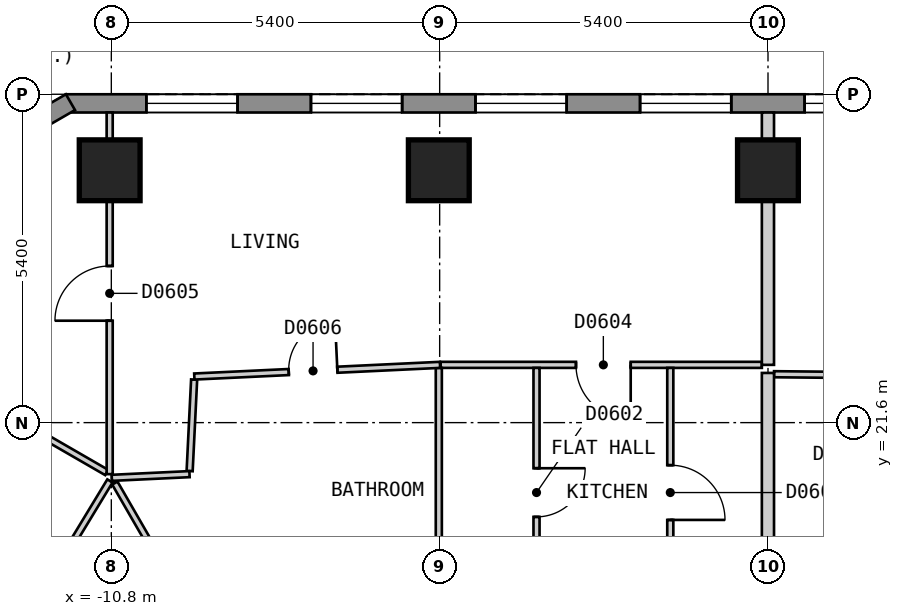
"""IFC4 building model, lengths in metres.
Left out: names, types, materials, properties, quantities, classifications, styles, units other than length and angle.
Written with IfcOpenShell. Run it as: python <this file> out.ifc"""

import sys

from ifc_helpers import new_model, si_unit, direction, frame, frame_2d, origin, origin_2d, place, context, subcontext, project, spatial, polyline, rectangle, outline, extrude, element, fill, save


model = new_model("IFC4")
c1 = context("Model", 3, precision=1e-05, world=origin(), true_north=direction((0.0, 1.0)))
c2 = subcontext(c1, "Body", "Model", "MODEL_VIEW")
j1 = project(units=[si_unit("LENGTHUNIT", "METRE"), si_unit("PLANEANGLEUNIT", "RADIAN")], contexts=[c1])
p1 = place(None, origin())
s1 = spatial("IfcSite", under=j1, at=p1, CompositionType="ELEMENT")
p2 = place(p1, origin())
s2 = spatial("IfcBuilding", under=s1, at=p2, CompositionType="ELEMENT")
p3 = place(p2, frame((0.0, 0.0, 75.0)))
s3 = spatial("IfcBuildingStorey", under=s2, at=p3, CompositionType="ELEMENT", Elevation=75.0)
for number, where, z_axis, x_axis in (
    (1, (-0.001, 25.75, 0.0), (0.0, 0.0, 1.0), (-1.0, 0.0, 0.0)),
    (2, (-5.414, 25.75, 0.0), (0.0, 0.0, 1.0), (-1.0, 0.0, 0.0)),
    (3, (-10.827, 25.75, 0.0), (0.0, 0.0, 1.0), (-1.0, 0.0, 0.0)),
):
    element("IfcColumn", number, at=place(p3, frame(where, z_axis=z_axis, x_axis=x_axis)), inside=s3, PredefinedType="COLUMN", context=c2, shape_type="SweptSolid", body=[
        extrude(rectangle(XDim=1.0, YDim=1.0, at=origin_2d()), origin(), (0.0, 0.0, 1.0), 3.0),
    ])
p4 = place(p3, frame((11.547, 26.85, 0.0), z_axis=(0.0, 0.0, 1.0), x_axis=(-1.0, 0.0, 0.0)))
e4 = element("IfcWall", 4, at=p4, inside=s3, PredefinedType="SOLIDWALL", context=c2, shape_type="SweptSolid", body=[
    extrude(outline(polyline([(0.0, -0.15), (23.094, -0.15), (23.014, 0.15), (0.08, 0.15), (0.0, -0.15)])), origin(), (0.0, 0.0, 1.0), 2.7),
])
p5 = place(p4, frame((1.325, 0.0, 0.15)))
e5 = element("IfcOpeningElement", 5, at=p5, cuts=e4, PredefinedType="OPENING", context=c2, shape_type="SweptSolid", body=[
    extrude(rectangle(XDim=1.5, YDim=2.1, at=frame_2d((0.75, 1.05))), frame((0.0, 0.16, 0.0), z_axis=(0.0, -1.0, 0.0), x_axis=(1.0, 0.0, 0.0)), (0.0, 0.0, 1.0), 0.32),
])
p6 = place(p4, frame((4.032, 0.0, 0.15)))
e6 = element("IfcOpeningElement", 6, at=p6, cuts=e4, PredefinedType="OPENING", context=c2, shape_type="SweptSolid", body=[
    extrude(rectangle(XDim=1.5, YDim=2.1, at=frame_2d((0.75, 1.05))), frame((0.0, 0.16, 0.0), z_axis=(0.0, -1.0, 0.0), x_axis=(1.0, 0.0, 0.0)), (0.0, 0.0, 1.0), 0.32),
])
p7 = place(p4, frame((6.738, 0.0, 0.15)))
e7 = element("IfcOpeningElement", 7, at=p7, cuts=e4, PredefinedType="OPENING", context=c2, shape_type="SweptSolid", body=[
    extrude(rectangle(XDim=1.5, YDim=2.1, at=frame_2d((0.75, 1.05))), frame((0.0, 0.16, 0.0), z_axis=(0.0, -1.0, 0.0), x_axis=(1.0, 0.0, 0.0)), (0.0, 0.0, 1.0), 0.32),
])
p8 = place(p4, frame((9.445, 0.0, 0.15)))
e8 = element("IfcOpeningElement", 8, at=p8, cuts=e4, PredefinedType="OPENING", context=c2, shape_type="SweptSolid", body=[
    extrude(rectangle(XDim=1.5, YDim=2.1, at=frame_2d((0.75, 1.05))), frame((0.0, 0.16, 0.0), z_axis=(0.0, -1.0, 0.0), x_axis=(1.0, 0.0, 0.0)), (0.0, 0.0, 1.0), 0.32),
])
p9 = place(p4, frame((12.151, 0.0, 0.15)))
e9 = element("IfcOpeningElement", 9, at=p9, cuts=e4, PredefinedType="OPENING", context=c2, shape_type="SweptSolid", body=[
    extrude(rectangle(XDim=1.5, YDim=2.1, at=frame_2d((0.75, 1.05))), frame((0.0, 0.16, 0.0), z_axis=(0.0, -1.0, 0.0), x_axis=(1.0, 0.0, 0.0)), (0.0, 0.0, 1.0), 0.32),
])
p10 = place(p4, frame((14.858, 0.0, 0.15)))
e10 = element("IfcOpeningElement", 10, at=p10, cuts=e4, PredefinedType="OPENING", context=c2, shape_type="SweptSolid", body=[
    extrude(rectangle(XDim=1.5, YDim=2.1, at=frame_2d((0.75, 1.05))), frame((0.0, 0.16, 0.0), z_axis=(0.0, -1.0, 0.0), x_axis=(1.0, 0.0, 0.0)), (0.0, 0.0, 1.0), 0.32),
])
p11 = place(p4, frame((17.564, 0.0, 0.15)))
e11 = element("IfcOpeningElement", 11, at=p11, cuts=e4, PredefinedType="OPENING", context=c2, shape_type="SweptSolid", body=[
    extrude(rectangle(XDim=1.5, YDim=2.1, at=frame_2d((0.75, 1.05))), frame((0.0, 0.16, 0.0), z_axis=(0.0, -1.0, 0.0), x_axis=(1.0, 0.0, 0.0)), (0.0, 0.0, 1.0), 0.32),
])
p12 = place(p4, frame((20.271, 0.0, 0.15)))
e12 = element("IfcOpeningElement", 12, at=p12, cuts=e4, PredefinedType="OPENING", context=c2, shape_type="SweptSolid", body=[
    extrude(rectangle(XDim=1.5, YDim=2.1, at=frame_2d((0.75, 1.05))), frame((0.0, 0.16, 0.0), z_axis=(0.0, -1.0, 0.0), x_axis=(1.0, 0.0, 0.0)), (0.0, 0.0, 1.0), 0.32),
])
p13 = place(p3, frame((-11.472, 26.87, 0.0), z_axis=(0.0, 0.0, 1.0), x_axis=(-0.866022959057, -0.500004234368, 0.0)))
e13 = element("IfcWall", 13, at=p13, inside=s3, PredefinedType="SOLIDWALL", context=c2, shape_type="SweptSolid", body=[
    extrude(outline(polyline([(0.0, -0.15), (5.0, -0.15), (4.92, 0.15), (0.08, 0.15), (0.0, -0.15)])), origin(), (0.0, 0.0, 1.0), 2.7),
])
p14 = place(p13, frame((0.65, 0.0, 0.15)))
e14 = element("IfcOpeningElement", 14, at=p14, cuts=e13, PredefinedType="OPENING", context=c2, shape_type="SweptSolid", body=[
    extrude(rectangle(XDim=1.2, YDim=2.1, at=frame_2d((0.6, 1.05))), frame((0.0, 0.16, 0.0), z_axis=(0.0, -1.0, 0.0), x_axis=(1.0, 0.0, 0.0)), (0.0, 0.0, 1.0), 0.32),
])
p15 = place(p13, frame((3.149, 0.0, 0.15)))
e15 = element("IfcOpeningElement", 15, at=p15, cuts=e13, PredefinedType="OPENING", context=c2, shape_type="SweptSolid", body=[
    extrude(rectangle(XDim=1.2, YDim=2.1, at=frame_2d((0.6, 1.05))), frame((0.0, 0.16, 0.0), z_axis=(0.0, -1.0, 0.0), x_axis=(1.0, 0.0, 0.0)), (0.0, 0.0, 1.0), 0.32),
])
p16 = place(p3, frame((0.099, 22.396, 0.0), z_axis=(0.0, 0.0, 1.0), x_axis=(0.999952228611, -0.009774481889, 0.0)))
e16 = element("IfcWall", 16, at=p16, inside=s3, PredefinedType="PARTITIONING", context=c2, shape_type="SweptSolid", body=[
    extrude(rectangle(XDim=2.148, YDim=0.1, at=frame_2d((1.074, 0.0))), origin(), (0.0, 0.0, 1.0), 2.7),
])
p17 = place(p3, frame((-10.742, 20.606, 0.0), z_axis=(0.0, 0.0, 1.0), x_axis=(0.50003312339, -0.866006279142, 0.0)))
e17 = element("IfcWall", 17, at=p17, inside=s3, PredefinedType="PARTITIONING", context=c2, shape_type="SweptSolid", body=[
    extrude(rectangle(XDim=4.626, YDim=0.1, at=frame_2d((2.313, 0.0))), origin(), (0.0, 0.0, 1.0), 2.7),
])
p18 = place(p3, frame((-15.977, 23.725, 0.0), z_axis=(0.0, 0.0, 1.0), x_axis=(0.866028213039, -0.499995134196, 0.0)))
e18 = element("IfcWall", 18, at=p18, inside=s3, PredefinedType="PARTITIONING", context=c2, shape_type="SweptSolid", body=[
    extrude(rectangle(XDim=5.89, YDim=0.1, at=frame_2d((2.945, 0.0))), origin(), (0.0, 0.0, 1.0), 2.7),
])
p19 = place(p18, frame((2.524, 0.0, 0.0)))
e19 = element("IfcOpeningElement", 19, at=p19, cuts=e18, PredefinedType="OPENING", context=c2, shape_type="SweptSolid", body=[
    extrude(rectangle(XDim=0.9, YDim=2.1, at=frame_2d((0.45, 1.05))), frame((0.0, 0.06, 0.0), z_axis=(0.0, -1.0, 0.0), x_axis=(1.0, 0.0, 0.0)), (0.0, 0.0, 1.0), 0.12),
])
p20 = place(p3, frame((-5.384, 22.55, 0.0), z_axis=(0.0, 0.0, 1.0), x_axis=(1.0, 0.0, 0.0)))
e20 = element("IfcWall", 20, at=p20, inside=s3, PredefinedType="PARTITIONING", context=c2, shape_type="SweptSolid", body=[
    extrude(rectangle(XDim=5.283, YDim=0.1, at=frame_2d((2.642, 0.0))), origin(), (0.0, 0.0, 1.0), 2.7),
])
p21 = place(p20, frame((2.226, 0.0, 0.0)))
e21 = element("IfcOpeningElement", 21, at=p21, cuts=e20, PredefinedType="OPENING", context=c2, shape_type="SweptSolid", body=[
    extrude(rectangle(XDim=0.9, YDim=2.1, at=frame_2d((0.45, 1.05))), frame((0.0, 0.06, 0.0), z_axis=(0.0, -1.0, 0.0), x_axis=(1.0, 0.0, 0.0)), (0.0, 0.0, 1.0), 0.12),
])
p22 = place(p3, frame((-13.328, 16.511, 0.0), z_axis=(0.0, 0.0, 1.0), x_axis=(0.518570528669, 0.855034857065, 0.0)))
e22 = element("IfcWall", 22, at=p22, inside=s3, PredefinedType="PARTITIONING", context=c2, shape_type="SweptSolid", body=[
    extrude(rectangle(XDim=4.83, YDim=0.1, at=frame_2d((2.415, 0.0))), origin(), (0.0, 0.0, 1.0), 2.7),
])
p23 = place(p22, frame((1.995, 0.0, 0.0)))
e23 = element("IfcOpeningElement", 23, at=p23, cuts=e22, PredefinedType="OPENING", context=c2, shape_type="SweptSolid", body=[
    extrude(rectangle(XDim=0.8, YDim=2.1, at=frame_2d((0.4, 1.05))), frame((0.0, 0.06, 0.0), z_axis=(0.0, -1.0, 0.0), x_axis=(1.0, 0.0, 0.0)), (0.0, 0.0, 1.0), 0.12),
])
p24 = place(p3, frame((-9.512, 20.803, 0.0), z_axis=(0.0, 0.0, 1.0), x_axis=(0.049089165168, 0.998794400196, 0.0)))
e24 = element("IfcWall", 24, at=p24, inside=s3, PredefinedType="PARTITIONING", context=c2, shape_type="SweptSolid", body=[
    extrude(rectangle(XDim=1.507, YDim=0.1, at=frame_2d((0.753, 0.0))), origin(), (0.0, 0.0, 1.0), 2.7),
])
p25 = place(p3, frame((-3.807, 18.45, 0.0), z_axis=(0.0, 0.0, 1.0), x_axis=(0.0, 1.0, 0.0)))
e25 = element("IfcWall", 25, at=p25, inside=s3, PredefinedType="PARTITIONING", context=c2, shape_type="SweptSolid", body=[
    extrude(rectangle(XDim=4.05, YDim=0.1, at=frame_2d((2.025, 0.0))), origin(), (0.0, 0.0, 1.0), 2.7),
])
p26 = place(p25, frame((1.6, 0.0, 0.0)))
e26 = element("IfcOpeningElement", 26, at=p26, cuts=e25, PredefinedType="OPENING", context=c2, shape_type="SweptSolid", body=[
    extrude(rectangle(XDim=0.8, YDim=2.1, at=frame_2d((0.4, 1.05))), frame((0.0, 0.06, 0.0), z_axis=(0.0, -1.0, 0.0), x_axis=(1.0, 0.0, 0.0)), (0.0, 0.0, 1.0), 0.12),
])
p27 = place(p3, frame((-5.414, 18.35, 0.0), z_axis=(0.0, 0.0, 1.0), x_axis=(0.0, 1.0, 0.0)))
e27 = element("IfcWall", 27, at=p27, inside=s3, PredefinedType="PARTITIONING", context=c2, shape_type="SweptSolid", body=[
    extrude(rectangle(XDim=4.15, YDim=0.1, at=frame_2d((2.075, 0.0))), origin(), (0.0, 0.0, 1.0), 2.7),
])
p28 = place(p3, frame((-10.827, 20.753, 0.0), z_axis=(0.0, 0.0, 1.0), x_axis=(0.0, 1.0, 0.0)))
e28 = element("IfcWall", 28, at=p28, inside=s3, PredefinedType="PARTITIONING", context=c2, shape_type="SweptSolid", body=[
    extrude(rectangle(XDim=5.947, YDim=0.1, at=frame_2d((2.974, 0.0))), origin(), (0.0, 0.0, 1.0), 2.7),
])
p29 = place(p28, frame((2.523, 0.0, 0.0)))
e29 = element("IfcOpeningElement", 29, at=p29, cuts=e28, PredefinedType="OPENING", context=c2, shape_type="SweptSolid", body=[
    extrude(rectangle(XDim=0.9, YDim=2.1, at=frame_2d((0.45, 1.05))), frame((0.0, 0.06, 0.0), z_axis=(0.0, -1.0, 0.0), x_axis=(1.0, 0.0, 0.0)), (0.0, 0.0, 1.0), 0.12),
])
p30 = place(p3, frame((-1.607, 18.45, 0.0), z_axis=(0.0, 0.0, 1.0), x_axis=(0.0, 1.0, 0.0)))
e30 = element("IfcWall", 30, at=p30, inside=s3, PredefinedType="PARTITIONING", context=c2, shape_type="SweptSolid", body=[
    extrude(rectangle(XDim=4.05, YDim=0.1, at=frame_2d((2.025, 0.0))), origin(), (0.0, 0.0, 1.0), 2.7),
])
p31 = place(p30, frame((1.55, 0.0, 0.0)))
e31 = element("IfcOpeningElement", 31, at=p31, cuts=e30, PredefinedType="OPENING", context=c2, shape_type="SweptSolid", body=[
    extrude(rectangle(XDim=0.9, YDim=2.1, at=frame_2d((0.45, 1.05))), frame((0.0, 0.06, 0.0), z_axis=(0.0, -1.0, 0.0), x_axis=(1.0, 0.0, 0.0)), (0.0, 0.0, 1.0), 0.12),
])
p32 = place(p3, frame((-10.792, 20.692, 0.0), z_axis=(0.0, 0.0, 1.0), x_axis=(0.998861653202, 0.04770112957, 0.0)))
e32 = element("IfcWall", 32, at=p32, inside=s3, PredefinedType="PARTITIONING", context=c2, shape_type="SweptSolid", body=[
    extrude(rectangle(XDim=1.28, YDim=0.1, at=frame_2d((0.64, 0.0))), origin(), (0.0, 0.0, 1.0), 2.7),
])
p33 = place(p3, frame((-9.435, 22.358, 0.0), z_axis=(0.0, 0.0, 1.0), x_axis=(0.998871548472, 0.04749346959, 0.0)))
e33 = element("IfcWall", 33, at=p33, inside=s3, PredefinedType="PARTITIONING", context=c2, shape_type="SweptSolid", body=[
    extrude(rectangle(XDim=4.046, YDim=0.1, at=frame_2d((2.023, 0.0))), origin(), (0.0, 0.0, 1.0), 2.7),
])
p34 = place(p33, frame((1.555, 0.0, 0.0)))
e34 = element("IfcOpeningElement", 34, at=p34, cuts=e33, PredefinedType="OPENING", context=c2, shape_type="SweptSolid", body=[
    extrude(rectangle(XDim=0.8, YDim=2.1, at=frame_2d((0.4, 1.05))), frame((0.0, 0.06, 0.0), z_axis=(0.0, -1.0, 0.0), x_axis=(1.0, 0.0, 0.0)), (0.0, 0.0, 1.0), 0.12),
])
p35 = place(p3, frame((-0.001, 18.45, 0.0), z_axis=(0.0, 0.0, 1.0), x_axis=(0.0, 1.0, 0.0)))
e35 = element("IfcWall", 35, at=p35, inside=s3, PredefinedType="PARTITIONING", context=c2, shape_type="SweptSolid", body=[
    extrude(rectangle(XDim=3.967, YDim=0.2, at=frame_2d((1.983, 0.0))), origin(), (0.0, 0.0, 1.0), 2.7),
])
p36 = place(p3, frame((-0.001, 22.55, 0.0), z_axis=(0.0, 0.0, 1.0), x_axis=(0.0, 1.0, 0.0)))
e36 = element("IfcWall", 36, at=p36, inside=s3, PredefinedType="PARTITIONING", context=c2, shape_type="SweptSolid", body=[
    extrude(rectangle(XDim=4.15, YDim=0.2, at=frame_2d((2.075, 0.0))), origin(), (0.0, 0.0, 1.0), 2.7),
])
p37 = place(p8, origin())
e37 = element("IfcWindow", 37, at=p37, inside=s3, PartitioningType="SINGLE_PANEL", PredefinedType="WINDOW", context=c2, shape_type="SweptSolid", body=[
    extrude(rectangle(XDim=1.5, YDim=2.1, at=frame_2d((0.75, 1.05))), frame((0.0, 0.03, 0.0), z_axis=(0.0, -1.0, 0.0), x_axis=(1.0, 0.0, 0.0)), (0.0, 0.0, 1.0), 0.06),
])
fill(e8, e37)
p38 = place(p9, origin())
e38 = element("IfcWindow", 38, at=p38, inside=s3, PartitioningType="SINGLE_PANEL", PredefinedType="WINDOW", context=c2, shape_type="SweptSolid", body=[
    extrude(rectangle(XDim=1.5, YDim=2.1, at=frame_2d((0.75, 1.05))), frame((0.0, 0.03, 0.0), z_axis=(0.0, -1.0, 0.0), x_axis=(1.0, 0.0, 0.0)), (0.0, 0.0, 1.0), 0.06),
])
fill(e9, e38)
p39 = place(p10, origin())
e39 = element("IfcWindow", 39, at=p39, inside=s3, PartitioningType="SINGLE_PANEL", PredefinedType="WINDOW", context=c2, shape_type="SweptSolid", body=[
    extrude(rectangle(XDim=1.5, YDim=2.1, at=frame_2d((0.75, 1.05))), frame((0.0, 0.03, 0.0), z_axis=(0.0, -1.0, 0.0), x_axis=(1.0, 0.0, 0.0)), (0.0, 0.0, 1.0), 0.06),
])
fill(e10, e39)
p40 = place(p11, origin())
e40 = element("IfcWindow", 40, at=p40, inside=s3, PartitioningType="SINGLE_PANEL", PredefinedType="WINDOW", context=c2, shape_type="SweptSolid", body=[
    extrude(rectangle(XDim=1.5, YDim=2.1, at=frame_2d((0.75, 1.05))), frame((0.0, 0.03, 0.0), z_axis=(0.0, -1.0, 0.0), x_axis=(1.0, 0.0, 0.0)), (0.0, 0.0, 1.0), 0.06),
])
fill(e11, e40)
p41 = place(p12, origin())
e41 = element("IfcWindow", 41, at=p41, inside=s3, PartitioningType="SINGLE_PANEL", PredefinedType="WINDOW", context=c2, shape_type="SweptSolid", body=[
    extrude(rectangle(XDim=1.5, YDim=2.1, at=frame_2d((0.75, 1.05))), frame((0.0, 0.03, 0.0), z_axis=(0.0, -1.0, 0.0), x_axis=(1.0, 0.0, 0.0)), (0.0, 0.0, 1.0), 0.06),
])
fill(e12, e41)
p42 = place(p26, origin())
e42 = element("IfcDoor", 42, at=p42, inside=s3, OperationType="SINGLE_SWING_RIGHT", PredefinedType="DOOR", context=c2, shape_type="SweptSolid", body=[
    extrude(rectangle(XDim=0.8, YDim=2.1, at=frame_2d((0.4, 1.05))), frame((0.0, 0.025, 0.0), z_axis=(0.0, -1.0, 0.0), x_axis=(1.0, 0.0, 0.0)), (0.0, 0.0, 1.0), 0.05),
])
fill(e26, e42)
p43 = place(p31, origin())
e43 = element("IfcDoor", 43, at=p43, inside=s3, OperationType="SINGLE_SWING_LEFT", PredefinedType="DOOR", context=c2, shape_type="SweptSolid", body=[
    extrude(rectangle(XDim=0.9, YDim=2.1, at=frame_2d((0.45, 1.05))), frame((0.0, 0.025, 0.0), z_axis=(0.0, -1.0, 0.0), x_axis=(1.0, 0.0, 0.0)), (0.0, 0.0, 1.0), 0.05),
])
fill(e31, e43)
p44 = place(p21, origin())
e44 = element("IfcDoor", 44, at=p44, inside=s3, OperationType="SINGLE_SWING_RIGHT", PredefinedType="DOOR", context=c2, shape_type="SweptSolid", body=[
    extrude(rectangle(XDim=0.9, YDim=2.1, at=frame_2d((0.45, 1.05))), frame((0.0, 0.025, 0.0), z_axis=(0.0, -1.0, 0.0), x_axis=(1.0, 0.0, 0.0)), (0.0, 0.0, 1.0), 0.05),
])
fill(e21, e44)
p45 = place(p29, origin())
e45 = element("IfcDoor", 45, at=p45, inside=s3, OperationType="SINGLE_SWING_LEFT", PredefinedType="DOOR", context=c2, shape_type="SweptSolid", body=[
    extrude(rectangle(XDim=0.9, YDim=2.1, at=frame_2d((0.45, 1.05))), frame((0.0, 0.025, 0.0), z_axis=(0.0, -1.0, 0.0), x_axis=(1.0, 0.0, 0.0)), (0.0, 0.0, 1.0), 0.05),
])
fill(e29, e45)
p46 = place(p34, origin())
e46 = element("IfcDoor", 46, at=p46, inside=s3, OperationType="SINGLE_SWING_RIGHT", PredefinedType="DOOR", context=c2, shape_type="SweptSolid", body=[
    extrude(rectangle(XDim=0.8, YDim=2.1, at=frame_2d((0.4, 1.05))), frame((0.0, 0.025, 0.0), z_axis=(0.0, -1.0, 0.0), x_axis=(1.0, 0.0, 0.0)), (0.0, 0.0, 1.0), 0.05),
])
fill(e34, e46)
save(model, sys.argv[1])
